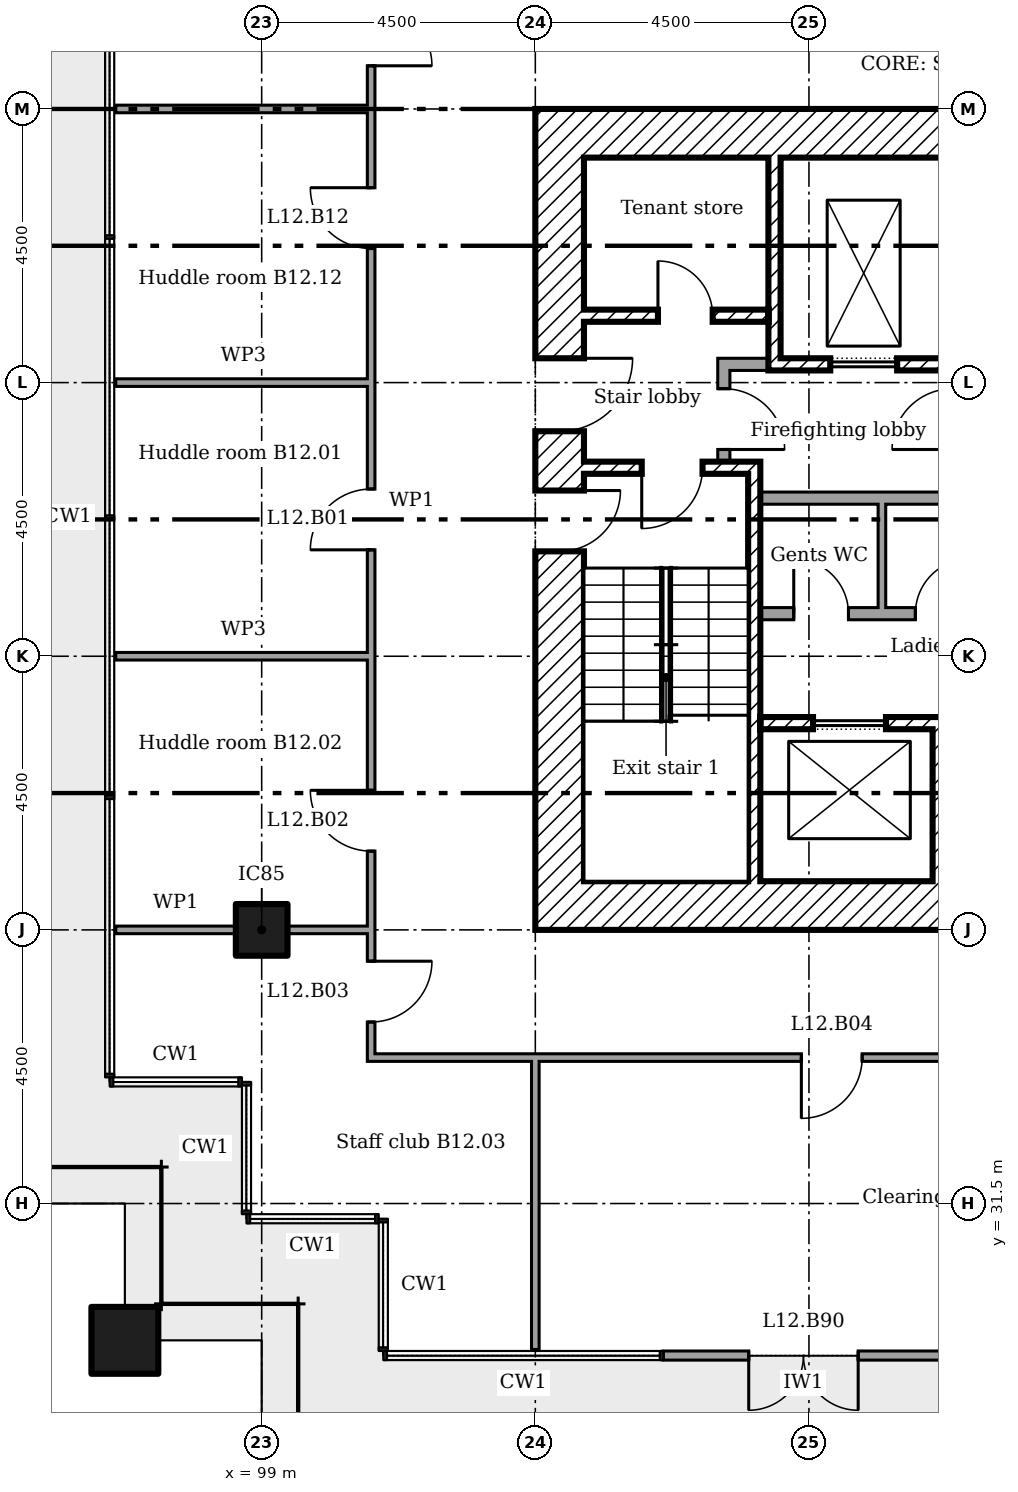
"""IFC4 building model, lengths in metres.
Left out: names, types, materials, properties, quantities, classifications, styles, units other than length and angle.
Written with IfcOpenShell. Run it as: python <this file> out.ifc"""

import sys

from ifc_helpers import new_model, si_unit, direction, frame, frame_2d, origin, origin_2d, place, context, subcontext, project, spatial, rectangle, extrude, element, fill, save


model = new_model("IFC4")
c1 = context("Model", 3, precision=1e-05, world=origin(), true_north=direction((0.0, 1.0)))
c2 = subcontext(c1, "Body", "Model", "MODEL_VIEW")
j1 = project(units=[si_unit("LENGTHUNIT", "METRE"), si_unit("PLANEANGLEUNIT", "RADIAN")], contexts=[c1])
p1 = place(None, origin())
s1 = spatial("IfcSite", under=j1, at=p1, CompositionType="ELEMENT")
p2 = place(p1, origin())
s2 = spatial("IfcBuilding", under=s1, at=p2, CompositionType="ELEMENT")
p3 = place(p2, frame((0.0, 0.0, 54.6)))
s3 = spatial("IfcBuildingStorey", under=s2, at=p3, CompositionType="ELEMENT", Elevation=54.6)
p4 = place(p3, frame((96.75, 29.25, 0.0)))
e1 = element("IfcColumn", 1, at=p4, inside=s3, PredefinedType="COLUMN", context=c2, shape_type="SweptSolid", body=[
    extrude(rectangle(XDim=1.1, YDim=1.1, at=origin_2d()), origin(), (0.0, 0.0, 1.0), 3.6),
])
p5 = place(p3, frame((99.0, 36.0, 0.0)))
e2 = element("IfcColumn", 2, at=p5, inside=s3, PredefinedType="COLUMN", context=c2, shape_type="SweptSolid", body=[
    extrude(rectangle(XDim=0.85, YDim=0.85, at=origin_2d()), origin(), (0.0, 0.0, 1.0), 3.6),
])
p6 = place(p3, frame((105.606, 29.0, 0.0)))
e3 = element("IfcWall", 3, at=p6, inside=s3, PredefinedType="SOLIDWALL", context=c2, shape_type="SweptSolid", body=[
    extrude(rectangle(XDim=4.606, YDim=0.15, at=frame_2d((2.303, 0.0))), origin(), (0.0, 0.0, 1.0), 3.45),
])
p7 = place(p6, frame((1.403, 0.0, 0.0)))
e4 = element("IfcOpeningElement", 4, at=p7, cuts=e3, PredefinedType="OPENING", context=c2, shape_type="SweptSolid", body=[
    extrude(rectangle(XDim=1.8, YDim=2.4, at=frame_2d((0.9, 1.2))), frame((0.0, 0.085, 0.0), z_axis=(0.0, -1.0, 0.0), x_axis=(1.0, 0.0, 0.0)), (0.0, 0.0, 1.0), 0.17),
])
for number, where in (
    (5, (104.3, 49.1, 0.0)),
    (6, (104.3, 36.4, 0.0)),
):
    element("IfcWall", number, at=place(p3, frame(where)), inside=s3, PredefinedType="SHEAR", context=c2, shape_type="SweptSolid", body=[
        extrude(rectangle(XDim=11.9, YDim=0.8, at=frame_2d((5.95, 0.0))), origin(), (0.0, 0.0, 1.0), 3.35),
    ])
p8 = place(p3, frame((103.9, 36.0, 0.0), z_axis=(0.0, 0.0, 1.0), x_axis=(0.0, 1.0, 0.0)))
e7 = element("IfcWall", 7, at=p8, inside=s3, PredefinedType="SHEAR", context=c2, shape_type="SweptSolid", body=[
    extrude(rectangle(XDim=13.5, YDim=0.8, at=frame_2d((6.75, 0.0))), origin(), (0.0, 0.0, 1.0), 3.35),
])
p9 = place(p8, frame((8.2, 0.0, 0.0)))
e8 = element("IfcOpeningElement", 8, at=p9, cuts=e7, PredefinedType="OPENING", context=c2, shape_type="SweptSolid", body=[
    extrude(rectangle(XDim=1.2, YDim=2.1, at=frame_2d((0.6, 1.05))), frame((0.0, 0.41, 0.0), z_axis=(0.0, -1.0, 0.0), x_axis=(1.0, 0.0, 0.0)), (0.0, 0.0, 1.0), 0.82),
])
p10 = place(p8, frame((6.225, 0.0, 0.0)))
e9 = element("IfcOpeningElement", 9, at=p10, cuts=e7, PredefinedType="OPENING", context=c2, shape_type="SweptSolid", body=[
    extrude(rectangle(XDim=1.0, YDim=2.1, at=frame_2d((0.5, 1.05))), frame((0.0, 0.41, 0.0), z_axis=(0.0, -1.0, 0.0), x_axis=(1.0, 0.0, 0.0)), (0.0, 0.0, 1.0), 0.82),
])
p11 = place(p3, frame((107.433, 48.7, 0.0), z_axis=(0.0, 0.0, 1.0), x_axis=(0.0, -1.0, 0.0)))
e10 = element("IfcWall", 10, at=p11, inside=s3, PredefinedType="SHEAR", context=c2, shape_type="SweptSolid", body=[
    extrude(rectangle(XDim=3.5, YDim=0.2, at=frame_2d((1.75, 0.0))), origin(), (0.0, 0.0, 1.0), 3.35),
])
p12 = place(p3, frame((110.133, 36.8, 0.0), z_axis=(0.0, 0.0, 1.0), x_axis=(0.0, 1.0, 0.0)))
e11 = element("IfcWall", 11, at=p12, inside=s3, PredefinedType="SHEAR", context=c2, shape_type="SweptSolid", body=[
    extrude(rectangle(XDim=2.5, YDim=0.2, at=frame_2d((1.25, 0.0))), origin(), (0.0, 0.0, 1.0), 3.35),
])
p13 = place(p3, frame((106.5, 45.3, 0.0)))
e12 = element("IfcWall", 12, at=p13, inside=s3, PredefinedType="PARTITIONING", context=c2, shape_type="SweptSolid", body=[
    extrude(rectangle(XDim=0.833, YDim=0.2, at=frame_2d((0.417, 0.0))), origin(), (0.0, 0.0, 1.0), 3.35),
])
p14 = place(p3, frame((106.6, 43.7, 0.0), z_axis=(0.0, 0.0, 1.0), x_axis=(0.0, 1.0, 0.0)))
e13 = element("IfcWall", 13, at=p14, inside=s3, PredefinedType="PARTITIONING", context=c2, shape_type="SweptSolid", body=[
    extrude(rectangle(XDim=1.5, YDim=0.2, at=frame_2d((0.75, 0.0))), origin(), (0.0, 0.0, 1.0), 3.35),
])
p15 = place(p14, frame((0.2, 0.0, 0.0)))
e14 = element("IfcOpeningElement", 14, at=p15, cuts=e13, PredefinedType="OPENING", context=c2, shape_type="SweptSolid", body=[
    extrude(rectangle(XDim=1.0, YDim=2.1, at=frame_2d((0.5, 1.05))), frame((0.0, 0.11, 0.0), z_axis=(0.0, -1.0, 0.0), x_axis=(1.0, 0.0, 0.0)), (0.0, 0.0, 1.0), 0.22),
])
p16 = place(p3, frame((104.3, 46.1, 0.0)))
e15 = element("IfcWall", 15, at=p16, inside=s3, PredefinedType="SHEAR", context=c2, shape_type="SweptSolid", body=[
    extrude(rectangle(XDim=3.033, YDim=0.2, at=frame_2d((1.517, 0.0))), origin(), (0.0, 0.0, 1.0), 3.35),
])
p17 = place(p16, frame((1.217, 0.0, 0.0)))
e16 = element("IfcOpeningElement", 16, at=p17, cuts=e15, PredefinedType="OPENING", context=c2, shape_type="SweptSolid", body=[
    extrude(rectangle(XDim=0.9, YDim=2.1, at=frame_2d((0.45, 1.05))), frame((0.0, 0.11, 0.0), z_axis=(0.0, -1.0, 0.0), x_axis=(1.0, 0.0, 0.0)), (0.0, 0.0, 1.0), 0.22),
])
p18 = place(p3, frame((107.533, 45.3, 0.0)))
e17 = element("IfcWall", 17, at=p18, inside=s3, PredefinedType="SHEAR", context=c2, shape_type="SweptSolid", body=[
    extrude(rectangle(XDim=2.733, YDim=0.2, at=frame_2d((1.367, 0.0))), origin(), (0.0, 0.0, 1.0), 3.35),
])
p19 = place(p18, frame((0.817, 0.0, 0.0)))
e18 = element("IfcOpeningElement", 18, at=p19, cuts=e17, PredefinedType="OPENING", context=c2, shape_type="SweptSolid", body=[
    extrude(rectangle(XDim=1.1, YDim=2.1, at=frame_2d((0.55, 1.05))), frame((0.0, 0.11, 0.0), z_axis=(0.0, -1.0, 0.0), x_axis=(1.0, 0.0, 0.0)), (0.0, 0.0, 1.0), 0.22),
])
p20 = place(p3, frame((107.2, 39.4, 0.0)))
e19 = element("IfcWall", 19, at=p20, inside=s3, PredefinedType="SHEAR", context=c2, shape_type="SweptSolid", body=[
    extrude(rectangle(XDim=9.0, YDim=0.2, at=frame_2d((4.5, 0.0))), origin(), (0.0, 0.0, 1.0), 3.35),
])
p21 = place(p20, frame((0.867, 0.0, 0.0)))
e20 = element("IfcOpeningElement", 20, at=p21, cuts=e19, PredefinedType="OPENING", context=c2, shape_type="SweptSolid", body=[
    extrude(rectangle(XDim=1.2, YDim=2.1, at=frame_2d((0.6, 1.05))), frame((0.0, 0.11, 0.0), z_axis=(0.0, -1.0, 0.0), x_axis=(1.0, 0.0, 0.0)), (0.0, 0.0, 1.0), 0.22),
])
p22 = place(p20, frame((3.8, 0.0, 0.0)))
e21 = element("IfcOpeningElement", 21, at=p22, cuts=e19, PredefinedType="OPENING", context=c2, shape_type="SweptSolid", body=[
    extrude(rectangle(XDim=1.2, YDim=2.1, at=frame_2d((0.6, 1.05))), frame((0.0, 0.11, 0.0), z_axis=(0.0, -1.0, 0.0), x_axis=(1.0, 0.0, 0.0)), (0.0, 0.0, 1.0), 0.22),
])
p23 = place(p20, frame((6.733, 0.0, 0.0)))
e22 = element("IfcOpeningElement", 22, at=p23, cuts=e19, PredefinedType="OPENING", context=c2, shape_type="SweptSolid", body=[
    extrude(rectangle(XDim=1.2, YDim=2.1, at=frame_2d((0.6, 1.05))), frame((0.0, 0.11, 0.0), z_axis=(0.0, -1.0, 0.0), x_axis=(1.0, 0.0, 0.0)), (0.0, 0.0, 1.0), 0.22),
])
p24 = place(p3, frame((107.1, 36.8, 0.0), z_axis=(0.0, 0.0, 1.0), x_axis=(0.0, 1.0, 0.0)))
e23 = element("IfcWall", 23, at=p24, inside=s3, PredefinedType="SHEAR", context=c2, shape_type="SweptSolid", body=[
    extrude(rectangle(XDim=6.9, YDim=0.2, at=frame_2d((3.45, 0.0))), origin(), (0.0, 0.0, 1.0), 3.35),
])
p25 = place(p3, frame((104.3, 43.6, 0.0)))
e24 = element("IfcWall", 24, at=p25, inside=s3, PredefinedType="SHEAR", context=c2, shape_type="SweptSolid", body=[
    extrude(rectangle(XDim=2.7, YDim=0.2, at=frame_2d((1.35, 0.0))), origin(), (0.0, 0.0, 1.0), 3.35),
])
p26 = place(p25, frame((0.95, 0.0, 0.0)))
e25 = element("IfcOpeningElement", 25, at=p26, cuts=e24, PredefinedType="OPENING", context=c2, shape_type="SweptSolid", body=[
    extrude(rectangle(XDim=1.0, YDim=2.1, at=frame_2d((0.5, 1.05))), frame((0.0, 0.11, 0.0), z_axis=(0.0, -1.0, 0.0), x_axis=(1.0, 0.0, 0.0)), (0.0, 0.0, 1.0), 0.22),
])
p27 = place(p3, frame((107.2, 43.1, 0.0)))
e26 = element("IfcWall", 26, at=p27, inside=s3, PredefinedType="PARTITIONING", context=c2, shape_type="SweptSolid", body=[
    extrude(rectangle(XDim=6.1, YDim=0.2, at=frame_2d((3.05, 0.0))), origin(), (0.0, 0.0, 1.0), 3.35),
])
p28 = place(p27, frame((4.6, 0.0, 0.0)))
e27 = element("IfcOpeningElement", 27, at=p28, cuts=e26, PredefinedType="OPENING", context=c2, shape_type="SweptSolid", body=[
    extrude(rectangle(XDim=0.9, YDim=2.1, at=frame_2d((0.45, 1.05))), frame((0.0, 0.11, 0.0), z_axis=(0.0, -1.0, 0.0), x_axis=(1.0, 0.0, 0.0)), (0.0, 0.0, 1.0), 0.22),
])
p29 = place(p3, frame((107.2, 41.2, 0.0)))
e28 = element("IfcWall", 28, at=p29, inside=s3, PredefinedType="PARTITIONING", context=c2, shape_type="SweptSolid", body=[
    extrude(rectangle(XDim=6.1, YDim=0.2, at=frame_2d((3.05, 0.0))), origin(), (0.0, 0.0, 1.0), 3.35),
])
p30 = place(p29, frame((0.55, 0.0, 0.0)))
e29 = element("IfcOpeningElement", 29, at=p30, cuts=e28, PredefinedType="OPENING", context=c2, shape_type="SweptSolid", body=[
    extrude(rectangle(XDim=0.9, YDim=2.1, at=frame_2d((0.45, 1.05))), frame((0.0, 0.11, 0.0), z_axis=(0.0, -1.0, 0.0), x_axis=(1.0, 0.0, 0.0)), (0.0, 0.0, 1.0), 0.22),
])
p31 = place(p29, frame((2.55, 0.0, 0.0)))
e30 = element("IfcOpeningElement", 30, at=p31, cuts=e28, PredefinedType="OPENING", context=c2, shape_type="SweptSolid", body=[
    extrude(rectangle(XDim=0.9, YDim=2.1, at=frame_2d((0.45, 1.05))), frame((0.0, 0.11, 0.0), z_axis=(0.0, -1.0, 0.0), x_axis=(1.0, 0.0, 0.0)), (0.0, 0.0, 1.0), 0.22),
])
p32 = place(p3, frame((109.2, 41.3, 0.0), z_axis=(0.0, 0.0, 1.0), x_axis=(0.0, 1.0, 0.0)))
e31 = element("IfcWall", 31, at=p32, inside=s3, PredefinedType="PARTITIONING", context=c2, shape_type="SweptSolid", body=[
    extrude(rectangle(XDim=1.7, YDim=0.125, at=frame_2d((0.85, 0.0))), origin(), (0.0, 0.0, 1.0), 3.35),
])
p33 = place(p3, frame((100.738, 33.9, 0.0)))
e32 = element("IfcWall", 32, at=p33, inside=s3, PredefinedType="PARTITIONING", context=c2, shape_type="SweptSolid", body=[
    extrude(rectangle(XDim=12.575, YDim=0.125, at=frame_2d((6.288, 0.0))), origin(), (0.0, 0.0, 1.0), 3.45),
])
p34 = place(p33, frame((7.137, 0.0, 0.0)))
e33 = element("IfcOpeningElement", 33, at=p34, cuts=e32, PredefinedType="OPENING", context=c2, shape_type="SweptSolid", body=[
    extrude(rectangle(XDim=1.0, YDim=2.1, at=frame_2d((0.5, 1.05))), frame((0.0, 0.073, 0.0), z_axis=(0.0, -1.0, 0.0), x_axis=(1.0, 0.0, 0.0)), (0.0, 0.0, 1.0), 0.145),
])
p35 = place(p3, frame((96.6, 36.0, 0.0)))
e34 = element("IfcWall", 34, at=p35, inside=s3, PredefinedType="PARTITIONING", context=c2, shape_type="SweptSolid", body=[
    extrude(rectangle(XDim=1.975, YDim=0.125, at=frame_2d((0.987, 0.0))), origin(), (0.0, 0.0, 1.0), 2.842),
])
p36 = place(p3, frame((99.425, 36.0, 0.0)))
e35 = element("IfcWall", 35, at=p36, inside=s3, PredefinedType="PARTITIONING", context=c2, shape_type="SweptSolid", body=[
    extrude(rectangle(XDim=1.375, YDim=0.125, at=frame_2d((0.688, 0.0))), origin(), (0.0, 0.0, 1.0), 2.842),
])
for number, where in (
    (36, (96.6, 40.5, 0.0)),
    (37, (96.6, 45.0, 0.0)),
):
    element("IfcWall", number, at=place(p3, frame(where)), inside=s3, PredefinedType="MOVABLE", context=c2, shape_type="SweptSolid", body=[
        extrude(rectangle(XDim=4.2, YDim=0.125, at=frame_2d((2.1, 0.0))), origin(), (0.0, 0.0, 1.0), 2.851),
    ])
p37 = place(p3, frame((96.6, 49.5, 0.0)))
e38 = element("IfcWall", 38, at=p37, inside=s3, PredefinedType="PARTITIONING", context=c2, shape_type="SweptSolid", body=[
    extrude(rectangle(XDim=4.2, YDim=0.125, at=frame_2d((2.1, 0.0))), origin(), (0.0, 0.0, 1.0), 2.851),
])
p38 = place(p3, frame((100.8, 33.962, 0.0), z_axis=(0.0, 0.0, 1.0), x_axis=(0.0, 1.0, 0.0)))
e39 = element("IfcWall", 39, at=p38, inside=s3, PredefinedType="PARTITIONING", context=c2, shape_type="SweptSolid", body=[
    extrude(rectangle(XDim=18.175, YDim=0.125, at=frame_2d((9.087, 0.0))), origin(), (0.0, 0.0, 1.0), 3.45),
])
p39 = place(p38, frame((8.288, 0.0, 0.0)))
e40 = element("IfcOpeningElement", 40, at=p39, cuts=e39, PredefinedType="OPENING", context=c2, shape_type="SweptSolid", body=[
    extrude(rectangle(XDim=1.0, YDim=2.1, at=frame_2d((0.5, 1.05))), frame((0.0, 0.073, 0.0), z_axis=(0.0, -1.0, 0.0), x_axis=(1.0, 0.0, 0.0)), (0.0, 0.0, 1.0), 0.145),
])
p40 = place(p38, frame((3.333, 0.0, 0.0)))
e41 = element("IfcOpeningElement", 41, at=p40, cuts=e39, PredefinedType="OPENING", context=c2, shape_type="SweptSolid", body=[
    extrude(rectangle(XDim=1.0, YDim=2.1, at=frame_2d((0.5, 1.05))), frame((0.0, 0.073, 0.0), z_axis=(0.0, -1.0, 0.0), x_axis=(1.0, 0.0, 0.0)), (0.0, 0.0, 1.0), 0.145),
])
p41 = place(p38, frame((0.522, 0.0, 0.0)))
e42 = element("IfcOpeningElement", 42, at=p41, cuts=e39, PredefinedType="OPENING", context=c2, shape_type="SweptSolid", body=[
    extrude(rectangle(XDim=1.0, YDim=2.1, at=frame_2d((0.5, 1.05))), frame((0.0, 0.073, 0.0), z_axis=(0.0, -1.0, 0.0), x_axis=(1.0, 0.0, 0.0)), (0.0, 0.0, 1.0), 0.145),
])
p42 = place(p38, frame((16.248, 0.0, 0.0)))
e43 = element("IfcOpeningElement", 43, at=p42, cuts=e39, PredefinedType="OPENING", context=c2, shape_type="SweptSolid", body=[
    extrude(rectangle(XDim=1.0, YDim=2.1, at=frame_2d((0.5, 1.05))), frame((0.0, 0.073, 0.0), z_axis=(0.0, -1.0, 0.0), x_axis=(1.0, 0.0, 0.0)), (0.0, 0.0, 1.0), 0.145),
])
p43 = place(p38, frame((13.242, 0.0, 0.0)))
e44 = element("IfcOpeningElement", 44, at=p43, cuts=e39, PredefinedType="OPENING", context=c2, shape_type="SweptSolid", body=[
    extrude(rectangle(XDim=1.0, YDim=2.1, at=frame_2d((0.5, 1.05))), frame((0.0, 0.073, 0.0), z_axis=(0.0, -1.0, 0.0), x_axis=(1.0, 0.0, 0.0)), (0.0, 0.0, 1.0), 0.145),
])
p44 = place(p3, frame((103.5, 29.1, 0.0), z_axis=(0.0, 0.0, 1.0), x_axis=(0.0, 1.0, 0.0)))
e45 = element("IfcWall", 45, at=p44, inside=s3, PredefinedType="PARTITIONING", context=c2, shape_type="SweptSolid", body=[
    extrude(rectangle(XDim=4.8, YDim=0.125, at=frame_2d((2.4, 0.0))), origin(), (0.0, 0.0, 1.0), 2.851),
])
p45 = place(p7, frame((1.8, 0.0, 0.0), x_axis=(-1.0, 0.0, 0.0)))
e46 = element("IfcDoor", 46, at=p45, inside=s3, OperationType="DOUBLE_DOOR_DOUBLE_SWING", PredefinedType="NOTDEFINED", context=c2, shape_type="SweptSolid", body=[
    extrude(rectangle(XDim=1.8, YDim=2.4, at=frame_2d((0.9, 1.2))), frame((0.0, 0.025, 0.0), z_axis=(0.0, -1.0, 0.0), x_axis=(1.0, 0.0, 0.0)), (0.0, 0.0, 1.0), 0.05),
])
fill(e4, e46)
p46 = place(p9, frame((1.2, 0.0, 0.0), x_axis=(-1.0, 0.0, 0.0)))
e47 = element("IfcDoor", 47, at=p46, inside=s3, OperationType="SINGLE_SWING_RIGHT", PredefinedType="DOOR", context=c2, shape_type="SweptSolid", body=[
    extrude(rectangle(XDim=1.2, YDim=2.1, at=frame_2d((0.6, 1.05))), frame((0.0, 0.025, 0.0), z_axis=(0.0, -1.0, 0.0), x_axis=(1.0, 0.0, 0.0)), (0.0, 0.0, 1.0), 0.05),
])
fill(e8, e47)
p47 = place(p26, frame((1.0, 0.0, 0.0), x_axis=(-1.0, 0.0, 0.0)))
e48 = element("IfcDoor", 48, at=p47, inside=s3, OperationType="SINGLE_SWING_LEFT", PredefinedType="DOOR", context=c2, shape_type="SweptSolid", body=[
    extrude(rectangle(XDim=1.0, YDim=2.1, at=frame_2d((0.5, 1.05))), frame((0.0, 0.025, 0.0), z_axis=(0.0, -1.0, 0.0), x_axis=(1.0, 0.0, 0.0)), (0.0, 0.0, 1.0), 0.05),
])
fill(e25, e48)
p48 = place(p10, frame((1.0, 0.0, 0.0), x_axis=(-1.0, 0.0, 0.0)))
e49 = element("IfcDoor", 49, at=p48, inside=s3, OperationType="SINGLE_SWING_RIGHT", PredefinedType="DOOR", context=c2, shape_type="SweptSolid", body=[
    extrude(rectangle(XDim=1.0, YDim=2.1, at=frame_2d((0.5, 1.05))), frame((0.0, 0.025, 0.0), z_axis=(0.0, -1.0, 0.0), x_axis=(1.0, 0.0, 0.0)), (0.0, 0.0, 1.0), 0.05),
])
fill(e9, e49)
p49 = place(p15, frame((1.0, 0.0, 0.0), x_axis=(-1.0, 0.0, 0.0)))
e50 = element("IfcDoor", 50, at=p49, inside=s3, OperationType="SINGLE_SWING_LEFT", PredefinedType="DOOR", context=c2, shape_type="SweptSolid", body=[
    extrude(rectangle(XDim=1.0, YDim=2.1, at=frame_2d((0.5, 1.05))), frame((0.0, 0.025, 0.0), z_axis=(0.0, -1.0, 0.0), x_axis=(1.0, 0.0, 0.0)), (0.0, 0.0, 1.0), 0.05),
])
fill(e14, e50)
p50 = place(p17, origin())
e51 = element("IfcDoor", 51, at=p50, inside=s3, OperationType="SINGLE_SWING_RIGHT", PredefinedType="DOOR", context=c2, shape_type="SweptSolid", body=[
    extrude(rectangle(XDim=0.9, YDim=2.1, at=frame_2d((0.45, 1.05))), frame((0.0, 0.025, 0.0), z_axis=(0.0, -1.0, 0.0), x_axis=(1.0, 0.0, 0.0)), (0.0, 0.0, 1.0), 0.05),
])
fill(e16, e51)
p51 = place(p30, origin())
e52 = element("IfcDoor", 52, at=p51, inside=s3, OperationType="SINGLE_SWING_RIGHT", PredefinedType="DOOR", context=c2, shape_type="SweptSolid", body=[
    extrude(rectangle(XDim=0.9, YDim=2.1, at=frame_2d((0.45, 1.05))), frame((0.0, 0.025, 0.0), z_axis=(0.0, -1.0, 0.0), x_axis=(1.0, 0.0, 0.0)), (0.0, 0.0, 1.0), 0.05),
])
fill(e29, e52)
p52 = place(p31, origin())
e53 = element("IfcDoor", 53, at=p52, inside=s3, OperationType="SINGLE_SWING_LEFT", PredefinedType="DOOR", context=c2, shape_type="SweptSolid", body=[
    extrude(rectangle(XDim=0.9, YDim=2.1, at=frame_2d((0.45, 1.05))), frame((0.0, 0.025, 0.0), z_axis=(0.0, -1.0, 0.0), x_axis=(1.0, 0.0, 0.0)), (0.0, 0.0, 1.0), 0.05),
])
fill(e30, e53)
p53 = place(p19, origin())
e54 = element("IfcDoor", 54, at=p53, inside=s3, OperationType="SLIDING_TO_LEFT", PredefinedType="DOOR", context=c2, shape_type="SweptSolid", body=[
    extrude(rectangle(XDim=1.1, YDim=2.1, at=frame_2d((0.55, 1.05))), frame((0.0, 0.025, 0.0), z_axis=(0.0, -1.0, 0.0), x_axis=(1.0, 0.0, 0.0)), (0.0, 0.0, 1.0), 0.05),
])
fill(e18, e54)
p54 = place(p21, origin())
e55 = element("IfcDoor", 55, at=p54, inside=s3, OperationType="SLIDING_TO_LEFT", PredefinedType="DOOR", context=c2, shape_type="SweptSolid", body=[
    extrude(rectangle(XDim=1.2, YDim=2.1, at=frame_2d((0.6, 1.05))), frame((0.0, 0.025, 0.0), z_axis=(0.0, -1.0, 0.0), x_axis=(1.0, 0.0, 0.0)), (0.0, 0.0, 1.0), 0.05),
])
fill(e20, e55)
p55 = place(p39, origin())
e56 = element("IfcDoor", 56, at=p55, inside=s3, OperationType="SINGLE_SWING_RIGHT", PredefinedType="DOOR", context=c2, shape_type="SweptSolid", body=[
    extrude(rectangle(XDim=1.0, YDim=2.1, at=frame_2d((0.5, 1.05))), frame((0.0, 0.025, 0.0), z_axis=(0.0, -1.0, 0.0), x_axis=(1.0, 0.0, 0.0)), (0.0, 0.0, 1.0), 0.05),
])
fill(e40, e56)
p56 = place(p40, origin())
e57 = element("IfcDoor", 57, at=p56, inside=s3, OperationType="SINGLE_SWING_LEFT", PredefinedType="DOOR", context=c2, shape_type="SweptSolid", body=[
    extrude(rectangle(XDim=1.0, YDim=2.1, at=frame_2d((0.5, 1.05))), frame((0.0, 0.025, 0.0), z_axis=(0.0, -1.0, 0.0), x_axis=(1.0, 0.0, 0.0)), (0.0, 0.0, 1.0), 0.05),
])
fill(e41, e57)
p57 = place(p41, frame((1.0, 0.0, 0.0), x_axis=(-1.0, 0.0, 0.0)))
e58 = element("IfcDoor", 58, at=p57, inside=s3, OperationType="SINGLE_SWING_RIGHT", PredefinedType="DOOR", context=c2, shape_type="SweptSolid", body=[
    extrude(rectangle(XDim=1.0, YDim=2.1, at=frame_2d((0.5, 1.05))), frame((0.0, 0.025, 0.0), z_axis=(0.0, -1.0, 0.0), x_axis=(1.0, 0.0, 0.0)), (0.0, 0.0, 1.0), 0.05),
])
fill(e42, e58)
p58 = place(p34, frame((1.0, 0.0, 0.0), x_axis=(-1.0, 0.0, 0.0)))
e59 = element("IfcDoor", 59, at=p58, inside=s3, OperationType="SINGLE_SWING_LEFT", PredefinedType="DOOR", context=c2, shape_type="SweptSolid", body=[
    extrude(rectangle(XDim=1.0, YDim=2.1, at=frame_2d((0.5, 1.05))), frame((0.0, 0.025, 0.0), z_axis=(0.0, -1.0, 0.0), x_axis=(1.0, 0.0, 0.0)), (0.0, 0.0, 1.0), 0.05),
])
fill(e33, e59)
p59 = place(p42, frame((1.0, 0.0, 0.0), x_axis=(-1.0, 0.0, 0.0)))
e60 = element("IfcDoor", 60, at=p59, inside=s3, OperationType="SINGLE_SWING_LEFT", PredefinedType="DOOR", context=c2, shape_type="SweptSolid", body=[
    extrude(rectangle(XDim=1.0, YDim=2.1, at=frame_2d((0.5, 1.05))), frame((0.0, 0.025, 0.0), z_axis=(0.0, -1.0, 0.0), x_axis=(1.0, 0.0, 0.0)), (0.0, 0.0, 1.0), 0.05),
])
fill(e43, e60)
p60 = place(p43, origin())
e61 = element("IfcDoor", 61, at=p60, inside=s3, OperationType="SINGLE_SWING_LEFT", PredefinedType="DOOR", context=c2, shape_type="SweptSolid", body=[
    extrude(rectangle(XDim=1.0, YDim=2.1, at=frame_2d((0.5, 1.05))), frame((0.0, 0.025, 0.0), z_axis=(0.0, -1.0, 0.0), x_axis=(1.0, 0.0, 0.0)), (0.0, 0.0, 1.0), 0.05),
])
fill(e44, e61)
save(model, sys.argv[1])
